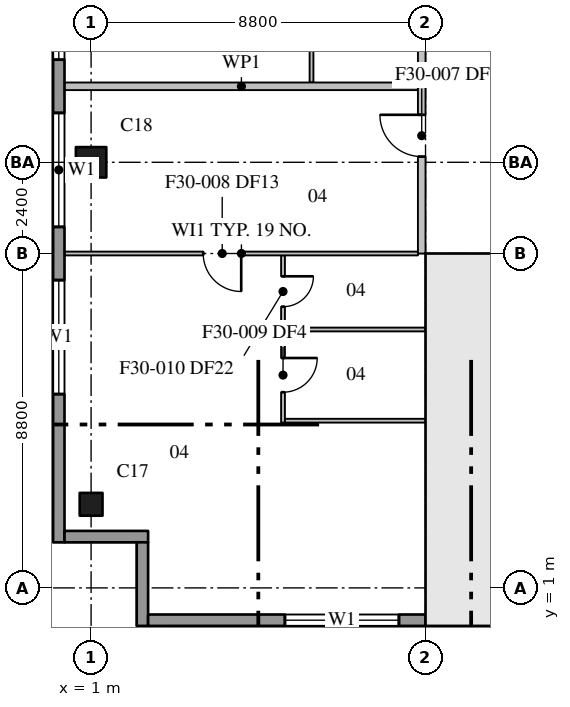
"""IFC4 building model, lengths in metres.
Left out: names, types, materials, properties, quantities, classifications, styles, units other than length and angle.
Written with IfcOpenShell. Run it as: python <this file> out.ifc"""

import sys

from ifc_helpers import new_model, si_unit, direction, frame, frame_2d, origin, origin_2d, place, context, subcontext, project, spatial, rectangle, extrude, element, fill, save


model = new_model("IFC4")
c1 = context("Model", 3, precision=1e-05, world=origin(), true_north=direction((0.0, 1.0)))
c2 = subcontext(c1, "Body", "Model", "MODEL_VIEW")
j1 = project(units=[si_unit("LENGTHUNIT", "METRE"), si_unit("PLANEANGLEUNIT", "RADIAN")], contexts=[c1])
p1 = place(None, origin())
s1 = spatial("IfcSite", under=j1, at=p1, CompositionType="ELEMENT")
p2 = place(p1, origin())
s2 = spatial("IfcBuilding", under=s1, at=p2, CompositionType="ELEMENT")
p3 = place(p2, frame((0.0, 0.0, 245.0)))
s3 = spatial("IfcBuildingStorey", under=s2, at=p3, CompositionType="ELEMENT", Elevation=245.0)
p4 = place(p3, frame((1.0, 3.2, 0.0), z_axis=(0.0, 0.0, 1.0), x_axis=(1.0, 0.0, 0.0)))
e1 = element("IfcColumn", 1, at=p4, inside=s3, PredefinedType="COLUMN", context=c2, shape_type="SweptSolid", body=[
    extrude(rectangle(XDim=0.6, YDim=0.6, at=origin_2d()), origin(), (0.0, 0.0, 1.0), 3.7),
])
p5 = place(p3, frame((1.0, 12.2, 0.0), z_axis=(0.0, 0.0, 1.0), x_axis=(1.0, 0.0, 0.0)))
e2 = element("IfcColumn", 2, at=p5, inside=s3, PredefinedType="COLUMN", context=c2, shape_type="SweptSolid", body=[
    extrude(rectangle(XDim=0.8, YDim=0.8, at=origin_2d()), origin(), (0.0, 0.0, 1.0), 3.7),
])
p6 = place(p3, frame((9.8, 0.95, 0.0), z_axis=(0.0, 0.0, 1.0), x_axis=(1.0, 0.0, 0.0)))
e3 = element("IfcWall", 3, at=p6, inside=s3, PredefinedType="SHEAR", context=c2, shape_type="SweptSolid", body=[
    extrude(rectangle(XDim=35.2, YDim=0.5, at=frame_2d((17.6, 0.0))), origin(), (0.0, 0.0, 1.0), 3.7),
])
p7 = place(p3, frame((10.75, 1.2, 0.0), z_axis=(0.0, 0.0, 1.0), x_axis=(0.0, 1.0, 0.0)))
e4 = element("IfcWall", 4, at=p7, inside=s3, PredefinedType="SHEAR", context=c2, shape_type="SweptSolid", body=[
    extrude(rectangle(XDim=8.6, YDim=0.5, at=frame_2d((4.3, 0.0))), origin(), (0.0, 0.0, 1.0), 3.7),
])
p8 = place(p3, frame((9.8, 9.6, 0.0), z_axis=(0.0, 0.0, 1.0), x_axis=(1.0, 0.0, 0.0)))
e5 = element("IfcWall", 5, at=p8, inside=s3, PredefinedType="SHEAR", context=c2, shape_type="SweptSolid", body=[
    extrude(rectangle(XDim=4.3, YDim=0.4, at=frame_2d((2.15, 0.0))), origin(), (0.0, 0.0, 1.0), 3.7),
])
p9 = place(p8, frame((2.05, 0.0, 0.0)))
e6 = element("IfcOpeningElement", 6, at=p9, cuts=e5, PredefinedType="OPENING", context=c2, shape_type="SweptSolid", body=[
    extrude(rectangle(XDim=1.2, YDim=2.1, at=frame_2d((0.6, 1.05))), frame((0.0, 0.21, 0.0), z_axis=(0.0, -1.0, 0.0), x_axis=(1.0, 0.0, 0.0)), (0.0, 0.0, 1.0), 0.42),
])
p10 = place(p3, frame((0.15, 31.65, 0.0), z_axis=(0.0, 0.0, 1.0), x_axis=(0.0, -1.0, 0.0)))
e7 = element("IfcWall", 7, at=p10, inside=s3, PredefinedType="STANDARD", context=c2, shape_type="SweptSolid", body=[
    extrude(rectangle(XDim=29.45, YDim=0.3, at=frame_2d((14.725, 0.0))), origin(), (0.0, 0.0, 1.0), 3.4),
])
p11 = place(p10, frame((4.95, 0.0, 0.75)))
e8 = element("IfcOpeningElement", 8, at=p11, cuts=e7, PredefinedType="OPENING", context=c2, shape_type="SweptSolid", body=[
    extrude(rectangle(XDim=3.0, YDim=2.3, at=frame_2d((1.5, 1.15))), frame((0.0, 0.16, 0.0), z_axis=(0.0, -1.0, 0.0), x_axis=(1.0, 0.0, 0.0)), (0.0, 0.0, 1.0), 0.32),
])
p12 = place(p10, frame((9.35, 0.0, 0.75)))
e9 = element("IfcOpeningElement", 9, at=p12, cuts=e7, PredefinedType="OPENING", context=c2, shape_type="SweptSolid", body=[
    extrude(rectangle(XDim=3.0, YDim=2.3, at=frame_2d((1.5, 1.15))), frame((0.0, 0.16, 0.0), z_axis=(0.0, -1.0, 0.0), x_axis=(1.0, 0.0, 0.0)), (0.0, 0.0, 1.0), 0.32),
])
p13 = place(p10, frame((13.75, 0.0, 0.75)))
e10 = element("IfcOpeningElement", 10, at=p13, cuts=e7, PredefinedType="OPENING", context=c2, shape_type="SweptSolid", body=[
    extrude(rectangle(XDim=3.0, YDim=2.3, at=frame_2d((1.5, 1.15))), frame((0.0, 0.16, 0.0), z_axis=(0.0, -1.0, 0.0), x_axis=(1.0, 0.0, 0.0)), (0.0, 0.0, 1.0), 0.32),
])
p14 = place(p10, frame((18.15, 0.0, 0.75)))
e11 = element("IfcOpeningElement", 11, at=p14, cuts=e7, PredefinedType="OPENING", context=c2, shape_type="SweptSolid", body=[
    extrude(rectangle(XDim=3.0, YDim=2.3, at=frame_2d((1.5, 1.15))), frame((0.0, 0.16, 0.0), z_axis=(0.0, -1.0, 0.0), x_axis=(1.0, 0.0, 0.0)), (0.0, 0.0, 1.0), 0.32),
])
p15 = place(p10, frame((22.55, 0.0, 0.75)))
e12 = element("IfcOpeningElement", 12, at=p15, cuts=e7, PredefinedType="OPENING", context=c2, shape_type="SweptSolid", body=[
    extrude(rectangle(XDim=3.0, YDim=2.3, at=frame_2d((1.5, 1.15))), frame((0.0, 0.16, 0.0), z_axis=(0.0, -1.0, 0.0), x_axis=(1.0, 0.0, 0.0)), (0.0, 0.0, 1.0), 0.32),
])
for number, where, z_axis, x_axis in (
    (13, (0.3, 2.35, 0.0), (0.0, 0.0, 1.0), (1.0, 0.0, 0.0)),
    (14, (2.35, 2.2, 0.0), (0.0, 0.0, 1.0), (0.0, -1.0, 0.0)),
):
    element("IfcWall", number, at=place(p3, frame(where, z_axis=z_axis, x_axis=x_axis)), inside=s3, PredefinedType="STANDARD", context=c2, shape_type="SweptSolid", body=[
        extrude(rectangle(XDim=2.2, YDim=0.3, at=frame_2d((1.1, 0.0))), origin(), (0.0, 0.0, 1.0), 3.4),
    ])
p16 = place(p3, frame((2.5, 0.15, 0.0), z_axis=(0.0, 0.0, 1.0), x_axis=(1.0, 0.0, 0.0)))
e15 = element("IfcWall", 15, at=p16, inside=s3, PredefinedType="STANDARD", context=c2, shape_type="SweptSolid", body=[
    extrude(rectangle(XDim=7.3, YDim=0.3, at=frame_2d((3.65, 0.0))), origin(), (0.0, 0.0, 1.0), 3.4),
])
p17 = place(p16, frame((3.6, 0.0, 0.75)))
e16 = element("IfcOpeningElement", 16, at=p17, cuts=e15, PredefinedType="OPENING", context=c2, shape_type="SweptSolid", body=[
    extrude(rectangle(XDim=3.0, YDim=2.3, at=frame_2d((1.5, 1.15))), frame((0.0, 0.16, 0.0), z_axis=(0.0, -1.0, 0.0), x_axis=(1.0, 0.0, 0.0)), (0.0, 0.0, 1.0), 0.32),
])
p18 = place(p3, frame((9.7, 9.8, 0.0), z_axis=(0.0, 0.0, 1.0), x_axis=(0.0, 1.0, 0.0)))
e17 = element("IfcWall", 17, at=p18, inside=s3, PredefinedType="PARTITIONING", context=c2, shape_type="SweptSolid", body=[
    extrude(rectangle(XDim=21.88, YDim=0.2, at=frame_2d((10.94, 0.0))), origin(), (0.0, 0.0, 1.0), 3.4),
])
p19 = place(p18, frame((2.55, 0.0, 0.0)))
e18 = element("IfcOpeningElement", 18, at=p19, cuts=e17, PredefinedType="OPENING", context=c2, shape_type="SweptSolid", body=[
    extrude(rectangle(XDim=1.1, YDim=2.1, at=frame_2d((0.55, 1.05))), frame((0.0, 0.11, 0.0), z_axis=(0.0, -1.0, 0.0), x_axis=(1.0, 0.0, 0.0)), (0.0, 0.0, 1.0), 0.22),
])
p20 = place(p18, frame((7.3, 0.0, 0.0)))
e19 = element("IfcOpeningElement", 19, at=p20, cuts=e17, PredefinedType="OPENING", context=c2, shape_type="SweptSolid", body=[
    extrude(rectangle(XDim=1.0, YDim=2.1, at=frame_2d((0.5, 1.05))), frame((0.0, 0.11, 0.0), z_axis=(0.0, -1.0, 0.0), x_axis=(1.0, 0.0, 0.0)), (0.0, 0.0, 1.0), 0.22),
])
p21 = place(p18, frame((12.45, 0.0, 0.0)))
e20 = element("IfcOpeningElement", 20, at=p21, cuts=e17, PredefinedType="OPENING", context=c2, shape_type="SweptSolid", body=[
    extrude(rectangle(XDim=1.1, YDim=2.1, at=frame_2d((0.55, 1.05))), frame((0.0, 0.11, 0.0), z_axis=(0.0, -1.0, 0.0), x_axis=(1.0, 0.0, 0.0)), (0.0, 0.0, 1.0), 0.22),
])
p22 = place(p3, frame((0.31, 14.2, 0.0), z_axis=(0.0, 0.0, 1.0), x_axis=(1.0, 0.0, 0.0)))
e21 = element("IfcWall", 21, at=p22, inside=s3, PredefinedType="PARTITIONING", context=c2, shape_type="SweptSolid", body=[
    extrude(rectangle(XDim=9.29, YDim=0.2, at=frame_2d((4.645, 0.0))), origin(), (0.0, 0.0, 1.0), 3.4),
])
p23 = place(p3, frame((6.05, 9.75, 0.0), z_axis=(0.0, 0.0, 1.0), x_axis=(0.0, -1.0, 0.0)))
e22 = element("IfcWall", 22, at=p23, inside=s3, PredefinedType="PARTITIONING", context=c2, shape_type="SweptSolid", body=[
    extrude(rectangle(XDim=4.4, YDim=0.1, at=frame_2d((2.2, 0.0))), origin(), (0.0, 0.0, 1.0), 3.4),
])
p24 = place(p23, frame((2.7, 0.0, 0.0)))
e23 = element("IfcOpeningElement", 23, at=p24, cuts=e22, PredefinedType="OPENING", context=c2, shape_type="SweptSolid", body=[
    extrude(rectangle(XDim=0.9, YDim=2.1, at=frame_2d((0.45, 1.05))), frame((0.0, 0.06, 0.0), z_axis=(0.0, -1.0, 0.0), x_axis=(1.0, 0.0, 0.0)), (0.0, 0.0, 1.0), 0.12),
])
p25 = place(p23, frame((0.55, 0.0, 0.0)))
e24 = element("IfcOpeningElement", 24, at=p25, cuts=e22, PredefinedType="OPENING", context=c2, shape_type="SweptSolid", body=[
    extrude(rectangle(XDim=0.8, YDim=2.1, at=frame_2d((0.4, 1.05))), frame((0.0, 0.06, 0.0), z_axis=(0.0, -1.0, 0.0), x_axis=(1.0, 0.0, 0.0)), (0.0, 0.0, 1.0), 0.12),
])
p26 = place(p3, frame((9.6, 9.8, 0.0), z_axis=(0.0, 0.0, 1.0), x_axis=(-1.0, 0.0, 0.0)))
e25 = element("IfcWall", 25, at=p26, inside=s3, PredefinedType="PARTITIONING", context=c2, shape_type="SweptSolid", body=[
    extrude(rectangle(XDim=9.29, YDim=0.1, at=frame_2d((4.645, 0.0))), origin(), (0.0, 0.0, 1.0), 3.4),
])
p27 = place(p26, frame((4.65, 0.0, 0.0)))
e26 = element("IfcOpeningElement", 26, at=p27, cuts=e25, PredefinedType="OPENING", context=c2, shape_type="SweptSolid", body=[
    extrude(rectangle(XDim=1.0, YDim=2.1, at=frame_2d((0.5, 1.05))), frame((0.0, 0.06, 0.0), z_axis=(0.0, -1.0, 0.0), x_axis=(1.0, 0.0, 0.0)), (0.0, 0.0, 1.0), 0.12),
])
for number, where, z_axis, x_axis in (
    (27, (6.1, 5.4, 0.0), (0.0, 0.0, 1.0), (1.0, 0.0, 0.0)),
    (28, (6.1, 7.8, 0.0), (0.0, 0.0, 1.0), (1.0, 0.0, 0.0)),
):
    element("IfcWall", number, at=place(p3, frame(where, z_axis=z_axis, x_axis=x_axis)), inside=s3, PredefinedType="PARTITIONING", context=c2, shape_type="SweptSolid", body=[
        extrude(rectangle(XDim=3.7, YDim=0.1, at=frame_2d((1.85, 0.0))), origin(), (0.0, 0.0, 1.0), 3.4),
    ])
p28 = place(p3, frame((6.8, 14.3, 0.0), z_axis=(0.0, 0.0, 1.0), x_axis=(0.0, 1.0, 0.0)))
e29 = element("IfcWall", 29, at=p28, inside=s3, PredefinedType="PARTITIONING", context=c2, shape_type="SweptSolid", body=[
    extrude(rectangle(XDim=2.65, YDim=0.1, at=frame_2d((1.325, 0.0))), origin(), (0.0, 0.0, 1.0), 3.4),
])
p29 = place(p13, origin())
e30 = element("IfcWindow", 30, at=p29, inside=s3, PartitioningType="SINGLE_PANEL", PredefinedType="WINDOW", context=c2, shape_type="SweptSolid", body=[
    extrude(rectangle(XDim=3.0, YDim=2.3, at=frame_2d((1.5, 1.15))), frame((0.0, 0.03, 0.0), z_axis=(0.0, -1.0, 0.0), x_axis=(1.0, 0.0, 0.0)), (0.0, 0.0, 1.0), 0.06),
])
fill(e10, e30)
p30 = place(p14, origin())
e31 = element("IfcWindow", 31, at=p30, inside=s3, PartitioningType="SINGLE_PANEL", PredefinedType="WINDOW", context=c2, shape_type="SweptSolid", body=[
    extrude(rectangle(XDim=3.0, YDim=2.3, at=frame_2d((1.5, 1.15))), frame((0.0, 0.03, 0.0), z_axis=(0.0, -1.0, 0.0), x_axis=(1.0, 0.0, 0.0)), (0.0, 0.0, 1.0), 0.06),
])
fill(e11, e31)
p31 = place(p15, origin())
e32 = element("IfcWindow", 32, at=p31, inside=s3, PartitioningType="SINGLE_PANEL", PredefinedType="WINDOW", context=c2, shape_type="SweptSolid", body=[
    extrude(rectangle(XDim=3.0, YDim=2.3, at=frame_2d((1.5, 1.15))), frame((0.0, 0.03, 0.0), z_axis=(0.0, -1.0, 0.0), x_axis=(1.0, 0.0, 0.0)), (0.0, 0.0, 1.0), 0.06),
])
fill(e12, e32)
p32 = place(p17, origin())
e33 = element("IfcWindow", 33, at=p32, inside=s3, PartitioningType="SINGLE_PANEL", PredefinedType="WINDOW", context=c2, shape_type="SweptSolid", body=[
    extrude(rectangle(XDim=3.0, YDim=2.3, at=frame_2d((1.5, 1.15))), frame((0.0, 0.03, 0.0), z_axis=(0.0, -1.0, 0.0), x_axis=(1.0, 0.0, 0.0)), (0.0, 0.0, 1.0), 0.06),
])
fill(e16, e33)
p33 = place(p19, origin())
e34 = element("IfcDoor", 34, at=p33, inside=s3, OperationType="SINGLE_SWING_RIGHT", PredefinedType="DOOR", context=c2, shape_type="SweptSolid", body=[
    extrude(rectangle(XDim=1.1, YDim=2.1, at=frame_2d((0.55, 1.05))), frame((0.0, 0.025, 0.0), z_axis=(0.0, -1.0, 0.0), x_axis=(1.0, 0.0, 0.0)), (0.0, 0.0, 1.0), 0.05),
])
fill(e18, e34)
p34 = place(p27, origin())
e35 = element("IfcDoor", 35, at=p34, inside=s3, OperationType="SINGLE_SWING_LEFT", PredefinedType="DOOR", context=c2, shape_type="SweptSolid", body=[
    extrude(rectangle(XDim=1.0, YDim=2.1, at=frame_2d((0.5, 1.05))), frame((0.0, 0.025, 0.0), z_axis=(0.0, -1.0, 0.0), x_axis=(1.0, 0.0, 0.0)), (0.0, 0.0, 1.0), 0.05),
])
fill(e26, e35)
p35 = place(p24, origin())
e36 = element("IfcDoor", 36, at=p35, inside=s3, OperationType="SINGLE_SWING_LEFT", PredefinedType="DOOR", context=c2, shape_type="SweptSolid", body=[
    extrude(rectangle(XDim=0.9, YDim=2.1, at=frame_2d((0.45, 1.05))), frame((0.0, 0.025, 0.0), z_axis=(0.0, -1.0, 0.0), x_axis=(1.0, 0.0, 0.0)), (0.0, 0.0, 1.0), 0.05),
])
fill(e23, e36)
p36 = place(p25, origin())
e37 = element("IfcDoor", 37, at=p36, inside=s3, OperationType="SINGLE_SWING_LEFT", PredefinedType="DOOR", context=c2, shape_type="SweptSolid", body=[
    extrude(rectangle(XDim=0.8, YDim=2.1, at=frame_2d((0.4, 1.05))), frame((0.0, 0.025, 0.0), z_axis=(0.0, -1.0, 0.0), x_axis=(1.0, 0.0, 0.0)), (0.0, 0.0, 1.0), 0.05),
])
fill(e24, e37)
save(model, sys.argv[1])
